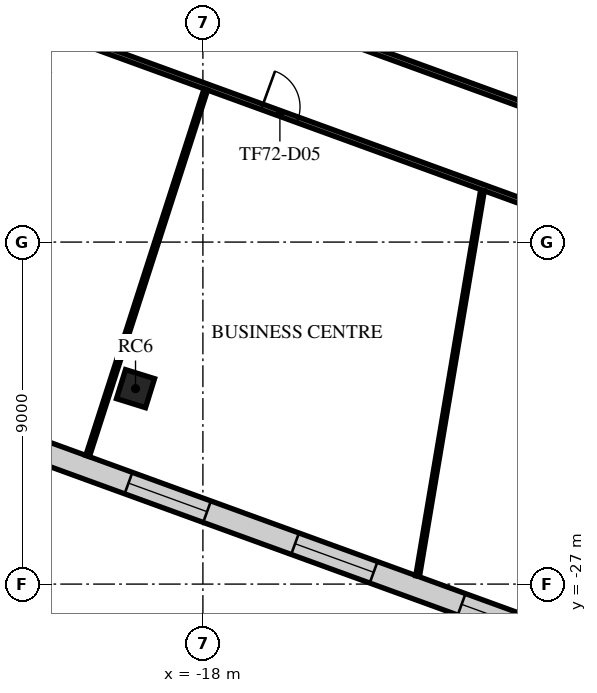
"""IFC4 building model, lengths in metres.
Left out: names, types, materials, properties, quantities, classifications, styles, units other than length and angle.
Written with IfcOpenShell. Run it as: python <this file> out.ifc"""

import sys

from ifc_helpers import new_model, si_unit, direction, frame, frame_2d, origin, origin_2d, place, context, subcontext, project, spatial, rectangle, extrude, element, fill, save


model = new_model("IFC4")
c1 = context("Model", 3, precision=1e-05, world=origin(), true_north=direction((0.0, 1.0)))
c2 = subcontext(c1, "Body", "Model", "MODEL_VIEW")
j1 = project(units=[si_unit("LENGTHUNIT", "METRE"), si_unit("PLANEANGLEUNIT", "RADIAN")], contexts=[c1])
p1 = place(None, origin())
s1 = spatial("IfcSite", under=j1, at=p1, CompositionType="ELEMENT")
p2 = place(p1, origin())
s2 = spatial("IfcBuilding", under=s1, at=p2, CompositionType="ELEMENT")
p3 = place(p2, frame((0.0, 0.0, 304.5)))
s3 = spatial("IfcBuildingStorey", under=s2, at=p3, CompositionType="ELEMENT", Elevation=304.5)
p4 = place(p3, frame((-19.773, -21.857, 0.0), z_axis=(0.0, 0.0, 1.0), x_axis=(0.297503182032, 0.954720826567, 0.0)))
e1 = element("IfcColumn", 1, at=p4, inside=s3, PredefinedType="COLUMN", context=c2, shape_type="SweptSolid", body=[
    extrude(rectangle(XDim=0.8, YDim=0.8, at=origin_2d()), origin(), (0.0, 0.0, 1.0), 4.0),
])
p5 = place(p3, frame((-16.71, 32.154, 0.0), z_axis=(0.0, 0.0, 1.0), x_axis=(-0.342021989849, -0.939691948704, 0.0)))
e2 = element("IfcWall", 2, at=p5, inside=s3, PredefinedType="STANDARD", context=c2, shape_type="SweptSolid", body=[
    extrude(rectangle(XDim=48.49, YDim=0.6, at=frame_2d((24.245, 0.0))), origin(), (0.0, 0.0, 1.0), 3.65),
])
p6 = place(p5, frame((1.204, 0.0, 0.9)))
e3 = element("IfcOpeningElement", 3, at=p6, cuts=e2, PredefinedType="OPENING", context=c2, shape_type="SweptSolid", body=[
    extrude(rectangle(XDim=2.0, YDim=2.1, at=frame_2d((1.0, 1.05))), frame((0.0, 0.31, 0.0), z_axis=(0.0, -1.0, 0.0), x_axis=(1.0, 0.0, 0.0)), (0.0, 0.0, 1.0), 0.62),
])
p7 = place(p5, frame((5.612, 0.0, 0.9)))
e4 = element("IfcOpeningElement", 4, at=p7, cuts=e2, PredefinedType="OPENING", context=c2, shape_type="SweptSolid", body=[
    extrude(rectangle(XDim=2.0, YDim=2.1, at=frame_2d((1.0, 1.05))), frame((0.0, 0.31, 0.0), z_axis=(0.0, -1.0, 0.0), x_axis=(1.0, 0.0, 0.0)), (0.0, 0.0, 1.0), 0.62),
])
p8 = place(p5, frame((10.021, 0.0, 0.9)))
e5 = element("IfcOpeningElement", 5, at=p8, cuts=e2, PredefinedType="OPENING", context=c2, shape_type="SweptSolid", body=[
    extrude(rectangle(XDim=2.0, YDim=2.1, at=frame_2d((1.0, 1.05))), frame((0.0, 0.31, 0.0), z_axis=(0.0, -1.0, 0.0), x_axis=(1.0, 0.0, 0.0)), (0.0, 0.0, 1.0), 0.62),
])
p9 = place(p5, frame((14.428, 0.0, 0.9)))
e6 = element("IfcOpeningElement", 6, at=p9, cuts=e2, PredefinedType="OPENING", context=c2, shape_type="SweptSolid", body=[
    extrude(rectangle(XDim=2.0, YDim=2.1, at=frame_2d((1.0, 1.05))), frame((0.0, 0.31, 0.0), z_axis=(0.0, -1.0, 0.0), x_axis=(1.0, 0.0, 0.0)), (0.0, 0.0, 1.0), 0.62),
])
p10 = place(p5, frame((18.837, 0.0, 0.9)))
e7 = element("IfcOpeningElement", 7, at=p10, cuts=e2, PredefinedType="OPENING", context=c2, shape_type="SweptSolid", body=[
    extrude(rectangle(XDim=2.0, YDim=2.1, at=frame_2d((1.0, 1.05))), frame((0.0, 0.31, 0.0), z_axis=(0.0, -1.0, 0.0), x_axis=(1.0, 0.0, 0.0)), (0.0, 0.0, 1.0), 0.62),
])
p11 = place(p5, frame((23.245, 0.0, 0.9)))
e8 = element("IfcOpeningElement", 8, at=p11, cuts=e2, PredefinedType="OPENING", context=c2, shape_type="SweptSolid", body=[
    extrude(rectangle(XDim=2.0, YDim=2.1, at=frame_2d((1.0, 1.05))), frame((0.0, 0.31, 0.0), z_axis=(0.0, -1.0, 0.0), x_axis=(1.0, 0.0, 0.0)), (0.0, 0.0, 1.0), 0.62),
])
p12 = place(p5, frame((27.653, 0.0, 0.9)))
e9 = element("IfcOpeningElement", 9, at=p12, cuts=e2, PredefinedType="OPENING", context=c2, shape_type="SweptSolid", body=[
    extrude(rectangle(XDim=2.0, YDim=2.1, at=frame_2d((1.0, 1.05))), frame((0.0, 0.31, 0.0), z_axis=(0.0, -1.0, 0.0), x_axis=(1.0, 0.0, 0.0)), (0.0, 0.0, 1.0), 0.62),
])
p13 = place(p5, frame((32.061, 0.0, 0.9)))
e10 = element("IfcOpeningElement", 10, at=p13, cuts=e2, PredefinedType="OPENING", context=c2, shape_type="SweptSolid", body=[
    extrude(rectangle(XDim=2.0, YDim=2.1, at=frame_2d((1.0, 1.05))), frame((0.0, 0.31, 0.0), z_axis=(0.0, -1.0, 0.0), x_axis=(1.0, 0.0, 0.0)), (0.0, 0.0, 1.0), 0.62),
])
p14 = place(p5, frame((36.469, 0.0, 0.9)))
e11 = element("IfcOpeningElement", 11, at=p14, cuts=e2, PredefinedType="OPENING", context=c2, shape_type="SweptSolid", body=[
    extrude(rectangle(XDim=2.0, YDim=2.1, at=frame_2d((1.0, 1.05))), frame((0.0, 0.31, 0.0), z_axis=(0.0, -1.0, 0.0), x_axis=(1.0, 0.0, 0.0)), (0.0, 0.0, 1.0), 0.62),
])
p15 = place(p5, frame((40.877, 0.0, 0.9)))
e12 = element("IfcOpeningElement", 12, at=p15, cuts=e2, PredefinedType="OPENING", context=c2, shape_type="SweptSolid", body=[
    extrude(rectangle(XDim=2.0, YDim=2.1, at=frame_2d((1.0, 1.05))), frame((0.0, 0.31, 0.0), z_axis=(0.0, -1.0, 0.0), x_axis=(1.0, 0.0, 0.0)), (0.0, 0.0, 1.0), 0.62),
])
p16 = place(p5, frame((45.285, 0.0, 0.9)))
e13 = element("IfcOpeningElement", 13, at=p16, cuts=e2, PredefinedType="OPENING", context=c2, shape_type="SweptSolid", body=[
    extrude(rectangle(XDim=2.0, YDim=2.1, at=frame_2d((1.0, 1.05))), frame((0.0, 0.31, 0.0), z_axis=(0.0, -1.0, 0.0), x_axis=(1.0, 0.0, 0.0)), (0.0, 0.0, 1.0), 0.62),
])
p17 = place(p3, frame((-29.882, -20.73, 0.0), z_axis=(0.0, 0.0, 1.0), x_axis=(0.939693709578, -0.34201715188, 0.0)))
e14 = element("IfcWall", 14, at=p17, inside=s3, PredefinedType="STANDARD", context=c2, shape_type="SweptSolid", body=[
    extrude(rectangle(XDim=41.979, YDim=0.6, at=frame_2d((20.99, 0.0))), origin(), (0.0, 0.0, 1.0), 3.65),
])
p18 = place(p17, frame((1.232, 0.0, 0.9)))
e15 = element("IfcOpeningElement", 15, at=p18, cuts=e14, PredefinedType="OPENING", context=c2, shape_type="SweptSolid", body=[
    extrude(rectangle(XDim=2.2, YDim=2.1, at=frame_2d((1.1, 1.05))), frame((0.0, 0.31, 0.0), z_axis=(0.0, -1.0, 0.0), x_axis=(1.0, 0.0, 0.0)), (0.0, 0.0, 1.0), 0.62),
])
p19 = place(p17, frame((5.896, 0.0, 0.9)))
e16 = element("IfcOpeningElement", 16, at=p19, cuts=e14, PredefinedType="OPENING", context=c2, shape_type="SweptSolid", body=[
    extrude(rectangle(XDim=2.2, YDim=2.1, at=frame_2d((1.1, 1.05))), frame((0.0, 0.31, 0.0), z_axis=(0.0, -1.0, 0.0), x_axis=(1.0, 0.0, 0.0)), (0.0, 0.0, 1.0), 0.62),
])
p20 = place(p17, frame((10.561, 0.0, 0.9)))
e17 = element("IfcOpeningElement", 17, at=p20, cuts=e14, PredefinedType="OPENING", context=c2, shape_type="SweptSolid", body=[
    extrude(rectangle(XDim=2.2, YDim=2.1, at=frame_2d((1.1, 1.05))), frame((0.0, 0.31, 0.0), z_axis=(0.0, -1.0, 0.0), x_axis=(1.0, 0.0, 0.0)), (0.0, 0.0, 1.0), 0.62),
])
p21 = place(p17, frame((15.225, 0.0, 0.9)))
e18 = element("IfcOpeningElement", 18, at=p21, cuts=e14, PredefinedType="OPENING", context=c2, shape_type="SweptSolid", body=[
    extrude(rectangle(XDim=2.2, YDim=2.1, at=frame_2d((1.1, 1.05))), frame((0.0, 0.31, 0.0), z_axis=(0.0, -1.0, 0.0), x_axis=(1.0, 0.0, 0.0)), (0.0, 0.0, 1.0), 0.62),
])
p22 = place(p17, frame((19.89, 0.0, 0.9)))
e19 = element("IfcOpeningElement", 19, at=p22, cuts=e14, PredefinedType="OPENING", context=c2, shape_type="SweptSolid", body=[
    extrude(rectangle(XDim=2.2, YDim=2.1, at=frame_2d((1.1, 1.05))), frame((0.0, 0.31, 0.0), z_axis=(0.0, -1.0, 0.0), x_axis=(1.0, 0.0, 0.0)), (0.0, 0.0, 1.0), 0.62),
])
p23 = place(p17, frame((24.554, 0.0, 0.9)))
e20 = element("IfcOpeningElement", 20, at=p23, cuts=e14, PredefinedType="OPENING", context=c2, shape_type="SweptSolid", body=[
    extrude(rectangle(XDim=2.2, YDim=2.1, at=frame_2d((1.1, 1.05))), frame((0.0, 0.31, 0.0), z_axis=(0.0, -1.0, 0.0), x_axis=(1.0, 0.0, 0.0)), (0.0, 0.0, 1.0), 0.62),
])
p24 = place(p17, frame((29.218, 0.0, 0.9)))
e21 = element("IfcOpeningElement", 21, at=p24, cuts=e14, PredefinedType="OPENING", context=c2, shape_type="SweptSolid", body=[
    extrude(rectangle(XDim=2.2, YDim=2.1, at=frame_2d((1.1, 1.05))), frame((0.0, 0.31, 0.0), z_axis=(0.0, -1.0, 0.0), x_axis=(1.0, 0.0, 0.0)), (0.0, 0.0, 1.0), 0.62),
])
p25 = place(p17, frame((33.883, 0.0, 0.9)))
e22 = element("IfcOpeningElement", 22, at=p25, cuts=e14, PredefinedType="OPENING", context=c2, shape_type="SweptSolid", body=[
    extrude(rectangle(XDim=2.2, YDim=2.1, at=frame_2d((1.1, 1.05))), frame((0.0, 0.31, 0.0), z_axis=(0.0, -1.0, 0.0), x_axis=(1.0, 0.0, 0.0)), (0.0, 0.0, 1.0), 0.62),
])
p26 = place(p17, frame((38.547, 0.0, 0.9)))
e23 = element("IfcOpeningElement", 23, at=p26, cuts=e14, PredefinedType="OPENING", context=c2, shape_type="SweptSolid", body=[
    extrude(rectangle(XDim=2.2, YDim=2.1, at=frame_2d((1.1, 1.05))), frame((0.0, 0.31, 0.0), z_axis=(0.0, -1.0, 0.0), x_axis=(1.0, 0.0, 0.0)), (0.0, 0.0, 1.0), 0.62),
])
p27 = place(p3, frame((-24.679, -11.445, 0.0), z_axis=(0.0, 0.0, 1.0), x_axis=(0.939685239834, -0.342040421645, 0.0)))
e24 = element("IfcWall", 24, at=p27, inside=s3, PredefinedType="PARTITIONING", context=c2, shape_type="SweptSolid", body=[
    extrude(rectangle(XDim=38.628, YDim=0.15, at=frame_2d((19.314, 0.0))), origin(), (0.0, 0.0, 1.0), 3.25),
])
p28 = place(p27, frame((8.764, 0.0, 0.0)))
e25 = element("IfcOpeningElement", 25, at=p28, cuts=e24, PredefinedType="OPENING", context=c2, shape_type="SweptSolid", body=[
    extrude(rectangle(XDim=1.0, YDim=2.1, at=frame_2d((0.5, 1.05))), frame((0.0, 0.085, 0.0), z_axis=(0.0, -1.0, 0.0), x_axis=(1.0, 0.0, 0.0)), (0.0, 0.0, 1.0), 0.17),
])
p29 = place(p27, frame((19.503, 0.0, 0.0)))
e26 = element("IfcOpeningElement", 26, at=p29, cuts=e24, PredefinedType="OPENING", context=c2, shape_type="SweptSolid", body=[
    extrude(rectangle(XDim=1.0, YDim=2.1, at=frame_2d((0.5, 1.05))), frame((0.0, 0.085, 0.0), z_axis=(0.0, -1.0, 0.0), x_axis=(1.0, 0.0, 0.0)), (0.0, 0.0, 1.0), 0.17),
])
p30 = place(p27, frame((29.163, 0.0, 0.0)))
e27 = element("IfcOpeningElement", 27, at=p30, cuts=e24, PredefinedType="OPENING", context=c2, shape_type="SweptSolid", body=[
    extrude(rectangle(XDim=1.0, YDim=2.1, at=frame_2d((0.5, 1.05))), frame((0.0, 0.085, 0.0), z_axis=(0.0, -1.0, 0.0), x_axis=(1.0, 0.0, 0.0)), (0.0, 0.0, 1.0), 0.17),
])
p31 = place(p3, frame((-14.604, -12.558, 0.0), z_axis=(0.0, 0.0, 1.0), x_axis=(0.93968732693, -0.342034687724, 0.0)))
e28 = element("IfcWall", 28, at=p31, inside=s3, PredefinedType="PARTITIONING", context=c2, shape_type="SweptSolid", body=[
    extrude(rectangle(XDim=14.182, YDim=0.15, at=frame_2d((7.091, 0.0))), origin(), (0.0, 0.0, 1.0), 3.25),
])
p32 = place(p3, frame((-21.033, -23.629, 0.0), z_axis=(0.0, 0.0, 1.0), x_axis=(0.306852130572, 0.951757201162, 0.0)))
e29 = element("IfcWall", 29, at=p32, inside=s3, PredefinedType="PARTITIONING", context=c2, shape_type="SweptSolid", body=[
    extrude(rectangle(XDim=10.133, YDim=0.1, at=frame_2d((5.066, 0.0))), origin(), (0.0, 0.0, 1.0), 3.05),
])
p33 = place(p3, frame((-12.349, -26.79, 0.0), z_axis=(0.0, 0.0, 1.0), x_axis=(0.165814832818, 0.986156904969, 0.0)))
e30 = element("IfcWall", 30, at=p33, inside=s3, PredefinedType="PARTITIONING", context=c2, shape_type="SweptSolid", body=[
    extrude(rectangle(XDim=10.289, YDim=0.1, at=frame_2d((5.145, 0.0))), origin(), (0.0, 0.0, 1.0), 3.05),
])
p34 = place(p20, origin())
e31 = element("IfcWindow", 31, at=p34, inside=s3, PartitioningType="SINGLE_PANEL", PredefinedType="WINDOW", context=c2, shape_type="SweptSolid", body=[
    extrude(rectangle(XDim=2.2, YDim=2.1, at=frame_2d((1.1, 1.05))), frame((0.0, 0.03, 0.0), z_axis=(0.0, -1.0, 0.0), x_axis=(1.0, 0.0, 0.0)), (0.0, 0.0, 1.0), 0.06),
])
fill(e17, e31)
p35 = place(p21, origin())
e32 = element("IfcWindow", 32, at=p35, inside=s3, PartitioningType="SINGLE_PANEL", PredefinedType="WINDOW", context=c2, shape_type="SweptSolid", body=[
    extrude(rectangle(XDim=2.2, YDim=2.1, at=frame_2d((1.1, 1.05))), frame((0.0, 0.03, 0.0), z_axis=(0.0, -1.0, 0.0), x_axis=(1.0, 0.0, 0.0)), (0.0, 0.0, 1.0), 0.06),
])
fill(e18, e32)
p36 = place(p22, origin())
e33 = element("IfcWindow", 33, at=p36, inside=s3, PartitioningType="SINGLE_PANEL", PredefinedType="WINDOW", context=c2, shape_type="SweptSolid", body=[
    extrude(rectangle(XDim=2.2, YDim=2.1, at=frame_2d((1.1, 1.05))), frame((0.0, 0.03, 0.0), z_axis=(0.0, -1.0, 0.0), x_axis=(1.0, 0.0, 0.0)), (0.0, 0.0, 1.0), 0.06),
])
fill(e19, e33)
p37 = place(p28, frame((1.0, 0.0, 0.0), z_axis=(0.0, 0.0, 1.0), x_axis=(-1.0, 0.0, 0.0)))
e34 = element("IfcDoor", 34, at=p37, inside=s3, OperationType="SINGLE_SWING_LEFT", PredefinedType="DOOR", context=c2, shape_type="SweptSolid", body=[
    extrude(rectangle(XDim=1.0, YDim=2.1, at=frame_2d((0.5, 1.05))), frame((0.0, 0.025, 0.0), z_axis=(0.0, -1.0, 0.0), x_axis=(1.0, 0.0, 0.0)), (0.0, 0.0, 1.0), 0.05),
])
fill(e25, e34)
save(model, sys.argv[1])
